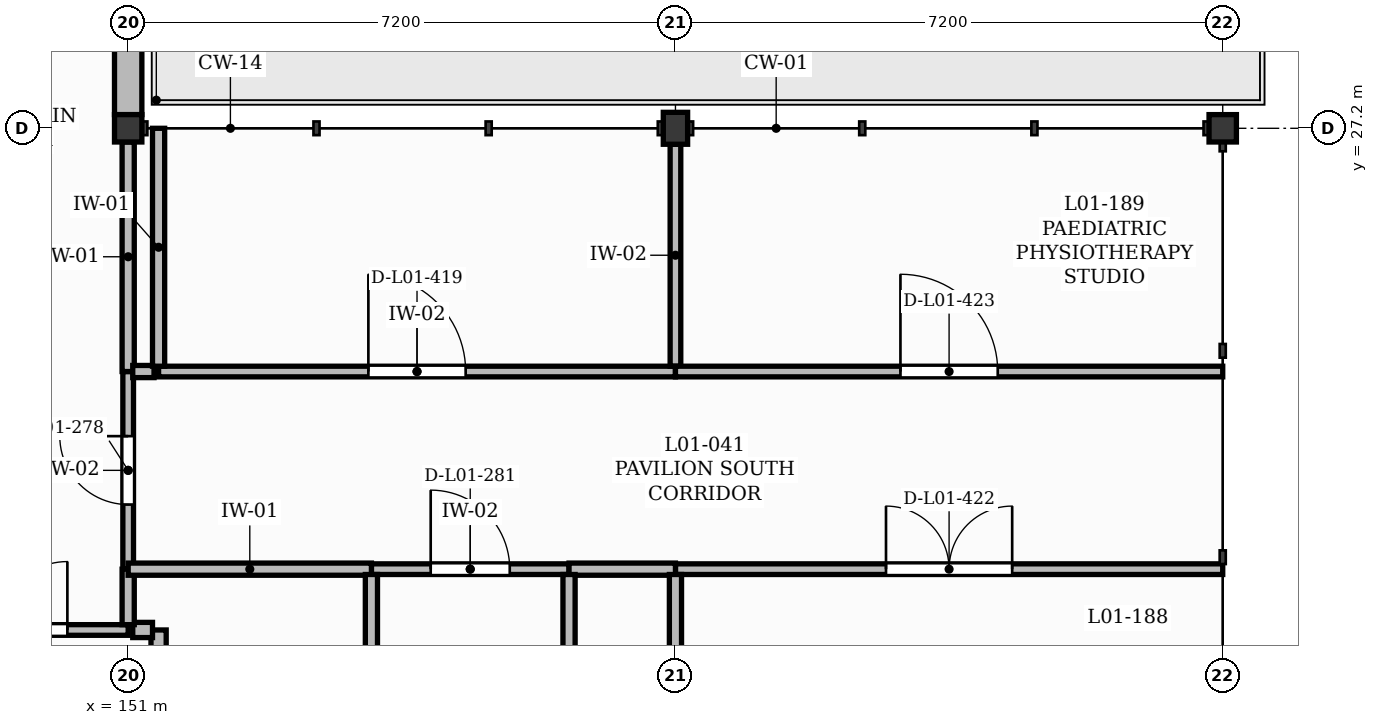
"""IFC4 building model, lengths in metres.
Left out: names, types, materials, properties, quantities, classifications, styles, units other than length and angle.
Written with IfcOpenShell. Run it as: python <this file> out.ifc"""

import sys

from ifc_helpers import new_model, si_unit, direction, frame, frame_2d, origin, origin_2d, place, context, subcontext, project, spatial, rectangle, extrude, element, fill, save


model = new_model("IFC4")
c1 = context("Model", 3, precision=1e-05, world=origin(), true_north=direction((0.0, 1.0)))
c2 = subcontext(c1, "Body", "Model", "MODEL_VIEW")
j1 = project(units=[si_unit("LENGTHUNIT", "METRE"), si_unit("PLANEANGLEUNIT", "RADIAN")], contexts=[c1])
p1 = place(None, origin())
s1 = spatial("IfcSite", under=j1, at=p1, CompositionType="ELEMENT")
p2 = place(p1, origin())
s2 = spatial("IfcBuilding", under=s1, at=p2, CompositionType="ELEMENT")
p3 = place(p2, frame((0.0, 0.0, 4.5)))
s3 = spatial("IfcBuildingStorey", under=s2, at=p3, CompositionType="ELEMENT", Elevation=4.5)
p4 = place(p3, frame((151.0, 27.2, 0.0), z_axis=(0.0, 0.0, 1.0), x_axis=(1.0, 0.0, 0.0)))
e1 = element("IfcColumn", 1, at=p4, inside=s3, PredefinedType="COLUMN", context=c2, shape_type="SweptSolid", body=[
    extrude(rectangle(XDim=0.36, YDim=0.36, at=origin_2d()), origin(), (0.0, 0.0, 1.0), 4.26),
])
p5 = place(p3, frame((158.2, 27.2, 0.0), z_axis=(0.0, 0.0, 1.0), x_axis=(1.0, 0.0, 0.0)))
e2 = element("IfcColumn", 2, at=p5, inside=s3, PredefinedType="COLUMN", context=c2, shape_type="SweptSolid", body=[
    extrude(rectangle(XDim=0.32, YDim=0.42, at=origin_2d()), origin(), (0.0, 0.0, 1.0), 4.26),
])
p6 = place(p3, frame((165.4, 27.2, 0.0), z_axis=(0.0, 0.0, 1.0), x_axis=(1.0, 0.0, 0.0)))
e3 = element("IfcColumn", 3, at=p6, inside=s3, PredefinedType="COLUMN", context=c2, shape_type="SweptSolid", body=[
    extrude(rectangle(XDim=0.36, YDim=0.36, at=origin_2d()), origin(), (0.0, 0.0, 1.0), 4.26),
])
p7 = place(p3, frame((151.0, 27.38, 0.0), z_axis=(0.0, 0.0, 1.0), x_axis=(0.0, 1.0, 0.0)))
e4 = element("IfcWall", 4, at=p7, inside=s3, PredefinedType="SOLIDWALL", context=c2, shape_type="SweptSolid", body=[
    extrude(rectangle(XDim=9.21, YDim=0.36, at=frame_2d((4.605, 0.0))), origin(), (0.0, 0.0, 1.0), 3.8),
])
p8 = place(p7, frame((3.655, 0.0, 0.0)))
e5 = element("IfcOpeningElement", 5, at=p8, cuts=e4, PredefinedType="OPENING", context=c2, shape_type="SweptSolid", body=[
    extrude(rectangle(XDim=1.9, YDim=2.5, at=frame_2d((0.95, 1.25))), frame((0.0, 0.19, 0.0), z_axis=(0.0, -1.0, 0.0), x_axis=(1.0, 0.0, 0.0)), (0.0, 0.0, 1.0), 0.38),
])
p9 = place(p7, frame((0.958, 0.0, 0.9)))
e6 = element("IfcOpeningElement", 6, at=p9, cuts=e4, PredefinedType="OPENING", context=c2, shape_type="SweptSolid", body=[
    extrude(rectangle(XDim=1.8, YDim=2.4, at=frame_2d((0.9, 1.2))), frame((0.0, 0.19, 0.0), z_axis=(0.0, -1.0, 0.0), x_axis=(1.0, 0.0, 0.0)), (0.0, 0.0, 1.0), 0.38),
])
p10 = place(p7, frame((6.377, 0.0, 0.9)))
e7 = element("IfcOpeningElement", 7, at=p10, cuts=e4, PredefinedType="OPENING", context=c2, shape_type="SweptSolid", body=[
    extrude(rectangle(XDim=1.95, YDim=2.4, at=frame_2d((0.975, 1.2))), frame((0.0, 0.19, 0.0), z_axis=(0.0, -1.0, 0.0), x_axis=(1.0, 0.0, 0.0)), (0.0, 0.0, 1.0), 0.38),
])
p11 = place(p3, frame((147.6, 20.6, 0.0), z_axis=(0.0, 0.0, 1.0), x_axis=(1.0, 0.0, 0.0)))
e8 = element("IfcWall", 8, at=p11, inside=s3, PredefinedType="PARTITIONING", context=c2, shape_type="SweptSolid", body=[
    extrude(rectangle(XDim=3.4, YDim=0.14, at=frame_2d((1.7, 0.0))), origin(), (0.0, 0.0, 1.0), 4.18),
])
p12 = place(p11, frame((0.8, 0.0, 0.0)))
e9 = element("IfcOpeningElement", 9, at=p12, cuts=e8, PredefinedType="OPENING", context=c2, shape_type="SweptSolid", body=[
    extrude(rectangle(XDim=1.8, YDim=2.3, at=frame_2d((0.9, 1.15))), frame((0.0, 0.08, 0.0), z_axis=(0.0, -1.0, 0.0), x_axis=(1.0, 0.0, 0.0)), (0.0, 0.0, 1.0), 0.16),
])
p13 = place(p3, frame((151.0, 21.4, 0.0), z_axis=(0.0, 0.0, 1.0), x_axis=(0.0, 1.0, 0.0)))
e10 = element("IfcWall", 10, at=p13, inside=s3, PredefinedType="PARTITIONING", context=c2, shape_type="SweptSolid", body=[
    extrude(rectangle(XDim=2.6, YDim=0.14, at=frame_2d((1.3, 0.0))), origin(), (0.0, 0.0, 1.0), 3.62),
])
p14 = place(p13, frame((0.85, 0.0, 0.0)))
e11 = element("IfcOpeningElement", 11, at=p14, cuts=e10, PredefinedType="OPENING", context=c2, shape_type="SweptSolid", body=[
    extrude(rectangle(XDim=0.9, YDim=2.1, at=frame_2d((0.45, 1.05))), frame((0.0, 0.08, 0.0), z_axis=(0.0, -1.0, 0.0), x_axis=(1.0, 0.0, 0.0)), (0.0, 0.0, 1.0), 0.16),
])
p15 = place(p3, frame((151.4, 24.0, 0.0), z_axis=(0.0, 0.0, 1.0), x_axis=(1.0, 0.0, 0.0)))
e12 = element("IfcWall", 12, at=p15, inside=s3, PredefinedType="PARTITIONING", context=c2, shape_type="SweptSolid", body=[
    extrude(rectangle(XDim=6.8, YDim=0.14, at=frame_2d((3.4, 0.0))), origin(), (0.0, 0.0, 1.0), 4.18),
])
p16 = place(p15, frame((2.76, 0.0, 0.0)))
e13 = element("IfcOpeningElement", 13, at=p16, cuts=e12, PredefinedType="OPENING", context=c2, shape_type="SweptSolid", body=[
    extrude(rectangle(XDim=1.28, YDim=2.2, at=frame_2d((0.64, 1.1))), frame((0.0, 0.08, 0.0), z_axis=(0.0, -1.0, 0.0), x_axis=(1.0, 0.0, 0.0)), (0.0, 0.0, 1.0), 0.16),
])
p17 = place(p3, frame((154.2, 21.4, 0.0), z_axis=(0.0, 0.0, 1.0), x_axis=(1.0, 0.0, 0.0)))
e14 = element("IfcWall", 14, at=p17, inside=s3, PredefinedType="PARTITIONING", context=c2, shape_type="SweptSolid", body=[
    extrude(rectangle(XDim=2.6, YDim=0.14, at=frame_2d((1.3, 0.0))), origin(), (0.0, 0.0, 1.0), 4.18),
])
p18 = place(p17, frame((0.78, 0.0, 0.0)))
e15 = element("IfcOpeningElement", 15, at=p18, cuts=e14, PredefinedType="OPENING", context=c2, shape_type="SweptSolid", body=[
    extrude(rectangle(XDim=1.04, YDim=2.1, at=frame_2d((0.52, 1.05))), frame((0.0, 0.08, 0.0), z_axis=(0.0, -1.0, 0.0), x_axis=(1.0, 0.0, 0.0)), (0.0, 0.0, 1.0), 0.16),
])
p19 = place(p3, frame((158.2, 21.4, 0.0), z_axis=(0.0, 0.0, 1.0), x_axis=(1.0, 0.0, 0.0)))
e16 = element("IfcWall", 16, at=p19, inside=s3, PredefinedType="PARTITIONING", context=c2, shape_type="SweptSolid", body=[
    extrude(rectangle(XDim=7.2, YDim=0.14, at=frame_2d((3.6, 0.0))), origin(), (0.0, 0.0, 1.0), 4.18),
])
p20 = place(p19, frame((2.77, 0.0, 0.0)))
e17 = element("IfcOpeningElement", 17, at=p20, cuts=e16, PredefinedType="OPENING", context=c2, shape_type="SweptSolid", body=[
    extrude(rectangle(XDim=1.66, YDim=2.3, at=frame_2d((0.83, 1.15))), frame((0.0, 0.08, 0.0), z_axis=(0.0, -1.0, 0.0), x_axis=(1.0, 0.0, 0.0)), (0.0, 0.0, 1.0), 0.16),
])
p21 = place(p3, frame((158.2, 24.07, 0.0), z_axis=(0.0, 0.0, 1.0), x_axis=(0.0, 1.0, 0.0)))
e18 = element("IfcWall", 18, at=p21, inside=s3, PredefinedType="PARTITIONING", context=c2, shape_type="SweptSolid", body=[
    extrude(rectangle(XDim=2.92, YDim=0.14, at=frame_2d((1.46, 0.0))), origin(), (0.0, 0.0, 1.0), 3.62),
])
p22 = place(p3, frame((158.2, 24.0, 0.0), z_axis=(0.0, 0.0, 1.0), x_axis=(1.0, 0.0, 0.0)))
e19 = element("IfcWall", 19, at=p22, inside=s3, PredefinedType="PARTITIONING", context=c2, shape_type="SweptSolid", body=[
    extrude(rectangle(XDim=7.2, YDim=0.14, at=frame_2d((3.6, 0.0))), origin(), (0.0, 0.0, 1.0), 4.18),
])
p23 = place(p22, frame((2.96, 0.0, 0.0)))
e20 = element("IfcOpeningElement", 20, at=p23, cuts=e19, PredefinedType="OPENING", context=c2, shape_type="SweptSolid", body=[
    extrude(rectangle(XDim=1.28, YDim=2.2, at=frame_2d((0.64, 1.1))), frame((0.0, 0.08, 0.0), z_axis=(0.0, -1.0, 0.0), x_axis=(1.0, 0.0, 0.0)), (0.0, 0.0, 1.0), 0.16),
])
p24 = place(p3, frame((151.4, 17.91, 0.0), z_axis=(0.0, 0.0, 1.0), x_axis=(0.0, 1.0, 0.0)))
e21 = element("IfcWall", 21, at=p24, inside=s3, PredefinedType="PARTITIONING", context=c2, shape_type="SweptSolid", body=[
    extrude(rectangle(XDim=2.69, YDim=0.2, at=frame_2d((1.345, 0.0))), origin(), (0.0, 0.0, 1.0), 4.18),
])
p25 = place(p3, frame((151.32, 20.6, 0.0), z_axis=(0.0, 0.0, 1.0), x_axis=(-1.0, 0.0, 0.0)))
e22 = element("IfcWall", 22, at=p25, inside=s3, PredefinedType="PARTITIONING", context=c2, shape_type="SweptSolid", body=[
    extrude(rectangle(XDim=0.26, YDim=0.2, at=frame_2d((0.13, 0.0))), origin(), (0.0, 0.0, 1.0), 4.18),
])
p26 = place(p3, frame((151.0, 20.67, 0.0), z_axis=(0.0, 0.0, 1.0), x_axis=(0.0, 1.0, 0.0)))
e23 = element("IfcWall", 23, at=p26, inside=s3, PredefinedType="PARTITIONING", context=c2, shape_type="SweptSolid", body=[
    extrude(rectangle(XDim=0.73, YDim=0.16, at=frame_2d((0.365, 0.0))), origin(), (0.0, 0.0, 1.0), 3.62),
])
p27 = place(p3, frame((151.0, 24.0, 0.0), z_axis=(0.0, 0.0, 1.0), x_axis=(0.0, 1.0, 0.0)))
e24 = element("IfcWall", 24, at=p27, inside=s3, PredefinedType="PARTITIONING", context=c2, shape_type="SweptSolid", body=[
    extrude(rectangle(XDim=3.02, YDim=0.16, at=frame_2d((1.51, 0.0))), origin(), (0.0, 0.0, 1.0), 3.62),
])
p28 = place(p3, frame((151.0, 21.4, 0.0), z_axis=(0.0, 0.0, 1.0), x_axis=(1.0, 0.0, 0.0)))
e25 = element("IfcWall", 25, at=p28, inside=s3, PredefinedType="PARTITIONING", context=c2, shape_type="SweptSolid", body=[
    extrude(rectangle(XDim=3.2, YDim=0.16, at=frame_2d((1.6, 0.0))), origin(), (0.0, 0.0, 1.0), 4.18),
])
p29 = place(p3, frame((156.8, 21.4, 0.0), z_axis=(0.0, 0.0, 1.0), x_axis=(1.0, 0.0, 0.0)))
e26 = element("IfcWall", 26, at=p29, inside=s3, PredefinedType="PARTITIONING", context=c2, shape_type="SweptSolid", body=[
    extrude(rectangle(XDim=1.4, YDim=0.16, at=frame_2d((0.7, 0.0))), origin(), (0.0, 0.0, 1.0), 4.18),
])
p30 = place(p3, frame((151.34, 24.0, 0.0), z_axis=(0.0, 0.0, 1.0), x_axis=(-1.0, 0.0, 0.0)))
e27 = element("IfcWall", 27, at=p30, inside=s3, PredefinedType="PARTITIONING", context=c2, shape_type="SweptSolid", body=[
    extrude(rectangle(XDim=0.28, YDim=0.16, at=frame_2d((0.14, 0.0))), origin(), (0.0, 0.0, 1.0), 4.18),
])
p31 = place(p3, frame((156.8, 17.8, 0.0), z_axis=(0.0, 0.0, 1.0), x_axis=(0.0, 1.0, 0.0)))
e28 = element("IfcWall", 28, at=p31, inside=s3, PredefinedType="PARTITIONING", context=c2, shape_type="SweptSolid", body=[
    extrude(rectangle(XDim=3.53, YDim=0.16, at=frame_2d((1.765, 0.0))), origin(), (0.0, 0.0, 1.0), 4.18),
])
p32 = place(p3, frame((154.2, 15.34, 0.0), z_axis=(0.0, 0.0, 1.0), x_axis=(0.0, 1.0, 0.0)))
e29 = element("IfcWall", 29, at=p32, inside=s3, PredefinedType="PARTITIONING", context=c2, shape_type="SweptSolid", body=[
    extrude(rectangle(XDim=5.99, YDim=0.16, at=frame_2d((2.995, 0.0))), origin(), (0.0, 0.0, 1.0), 4.18),
])
p33 = place(p3, frame((151.4, 24.07, 0.0), z_axis=(0.0, 0.0, 1.0), x_axis=(0.0, 1.0, 0.0)))
e30 = element("IfcWall", 30, at=p33, inside=s3, PredefinedType="PARTITIONING", context=c2, shape_type="SweptSolid", body=[
    extrude(rectangle(XDim=3.13, YDim=0.16, at=frame_2d((1.565, 0.0))), origin(), (0.0, 0.0, 1.0), 4.18),
])
p34 = place(p3, frame((158.2, 18.78, 0.0), z_axis=(0.0, 0.0, 1.0), x_axis=(0.0, 1.0, 0.0)))
e31 = element("IfcWall", 31, at=p34, inside=s3, PredefinedType="PARTITIONING", context=c2, shape_type="SweptSolid", body=[
    extrude(rectangle(XDim=2.55, YDim=0.16, at=frame_2d((1.275, 0.0))), origin(), (0.0, 0.0, 1.0), 3.62),
])
p35 = place(p12, origin())
e32 = element("IfcDoor", 32, at=p35, inside=s3, OperationType="DOUBLE_DOOR_SINGLE_SWING", PredefinedType="DOOR", context=c2, shape_type="SweptSolid", body=[
    extrude(rectangle(XDim=1.8, YDim=2.3, at=frame_2d((0.9, 1.15))), frame((0.0, 0.025, 0.0), z_axis=(0.0, -1.0, 0.0), x_axis=(1.0, 0.0, 0.0)), (0.0, 0.0, 1.0), 0.05),
])
fill(e9, e32)
p36 = place(p14, origin())
e33 = element("IfcDoor", 33, at=p36, inside=s3, OperationType="SINGLE_SWING_RIGHT", PredefinedType="DOOR", context=c2, shape_type="SweptSolid", body=[
    extrude(rectangle(XDim=0.9, YDim=2.1, at=frame_2d((0.45, 1.05))), frame((0.0, 0.025, 0.0), z_axis=(0.0, -1.0, 0.0), x_axis=(1.0, 0.0, 0.0)), (0.0, 0.0, 1.0), 0.05),
])
fill(e11, e33)
p37 = place(p18, origin())
e34 = element("IfcDoor", 34, at=p37, inside=s3, OperationType="SINGLE_SWING_LEFT", PredefinedType="DOOR", context=c2, shape_type="SweptSolid", body=[
    extrude(rectangle(XDim=1.04, YDim=2.1, at=frame_2d((0.52, 1.05))), frame((0.0, 0.025, 0.0), z_axis=(0.0, -1.0, 0.0), x_axis=(1.0, 0.0, 0.0)), (0.0, 0.0, 1.0), 0.05),
])
fill(e15, e34)
p38 = place(p16, origin())
e35 = element("IfcDoor", 35, at=p38, inside=s3, OperationType="SINGLE_SWING_LEFT", PredefinedType="DOOR", context=c2, shape_type="SweptSolid", body=[
    extrude(rectangle(XDim=1.28, YDim=2.2, at=frame_2d((0.64, 1.1))), frame((0.0, 0.025, 0.0), z_axis=(0.0, -1.0, 0.0), x_axis=(1.0, 0.0, 0.0)), (0.0, 0.0, 1.0), 0.05),
])
fill(e13, e35)
p39 = place(p20, origin())
e36 = element("IfcDoor", 36, at=p39, inside=s3, OperationType="DOUBLE_DOOR_SINGLE_SWING", PredefinedType="DOOR", context=c2, shape_type="SweptSolid", body=[
    extrude(rectangle(XDim=1.66, YDim=2.3, at=frame_2d((0.83, 1.15))), frame((0.0, 0.025, 0.0), z_axis=(0.0, -1.0, 0.0), x_axis=(1.0, 0.0, 0.0)), (0.0, 0.0, 1.0), 0.05),
])
fill(e17, e36)
p40 = place(p23, origin())
e37 = element("IfcDoor", 37, at=p40, inside=s3, OperationType="SINGLE_SWING_LEFT", PredefinedType="DOOR", context=c2, shape_type="SweptSolid", body=[
    extrude(rectangle(XDim=1.28, YDim=2.2, at=frame_2d((0.64, 1.1))), frame((0.0, 0.025, 0.0), z_axis=(0.0, -1.0, 0.0), x_axis=(1.0, 0.0, 0.0)), (0.0, 0.0, 1.0), 0.05),
])
fill(e20, e37)
save(model, sys.argv[1])
